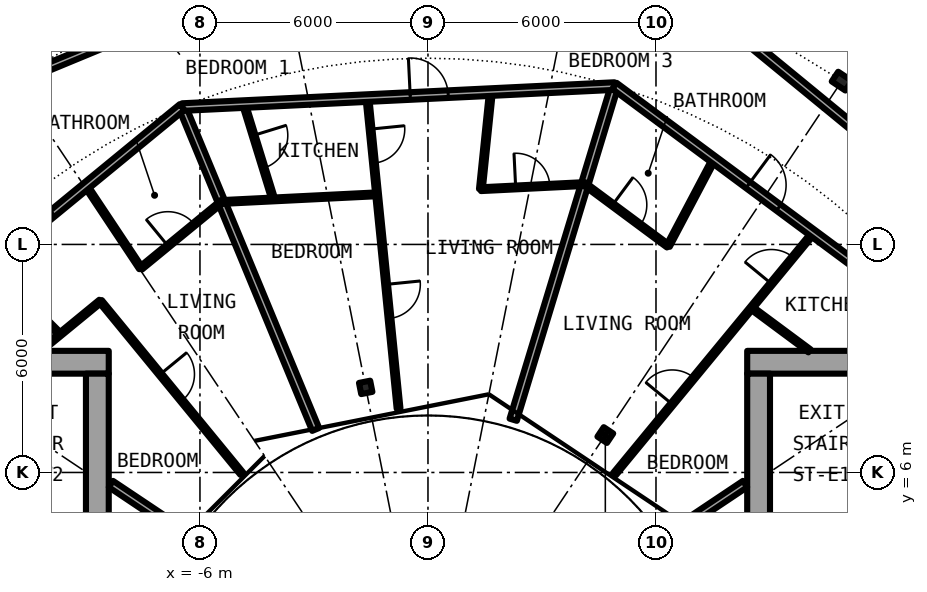
"""IFC4 building model, lengths in metres.
Left out: names, types, materials, properties, quantities, classifications, styles, units other than length and angle.
Written with IfcOpenShell. Run it as: python <this file> out.ifc"""

import sys

from ifc_helpers import new_model, si_unit, direction, frame, frame_2d, origin, origin_2d, place, context, subcontext, project, spatial, rectangle, i_section, extrude, element, fill, save


model = new_model("IFC4")
c1 = context("Model", 3, precision=1e-05, world=origin(), true_north=direction((0.0, 1.0)))
c2 = subcontext(c1, "Body", "Model", "MODEL_VIEW")
j1 = project(units=[si_unit("LENGTHUNIT", "METRE"), si_unit("PLANEANGLEUNIT", "RADIAN")], contexts=[c1])
p1 = place(None, origin())
s1 = spatial("IfcSite", under=j1, at=p1, CompositionType="ELEMENT")
p2 = place(p1, origin())
s2 = spatial("IfcBuilding", under=s1, at=p2, CompositionType="ELEMENT")
p3 = place(p2, frame((0.0, 0.0, 111.65)))
s3 = spatial("IfcBuildingStorey", under=s2, at=p3, CompositionType="ELEMENT", Elevation=111.65)
p4 = place(p3, frame((10.889, 16.297, 0.0), z_axis=(0.0, 0.0, 1.0), x_axis=(0.55557023302, 0.831469612303, 0.0)))
e1 = element("IfcColumn", 1, at=p4, inside=s3, PredefinedType="COLUMN", context=c2, shape_type="SweptSolid", body=[
    extrude(i_section(OverallWidth=0.307, OverallDepth=0.432, WebThickness=0.021, FlangeThickness=0.04, FilletRadius=0.027, at=origin_2d()), origin(), (0.0, 0.0, 1.0), 3.05),
])
for number, where, z_axis, x_axis in (
    (2, (4.667, 6.984, 0.0), (0.0, 0.0, 1.0), (0.556, 0.831, 0.0)),
    (3, (-1.639, 8.239, 0.0), (0.0, 0.0, 1.0), (-0.195, 0.981, 0.0)),
):
    element("IfcColumn", number, at=place(p3, frame(where, z_axis=z_axis, x_axis=x_axis)), inside=s3, PredefinedType="COLUMN", context=c2, shape_type="SweptSolid", body=[
        extrude(i_section(OverallWidth=0.3, OverallDepth=0.3, WebThickness=0.011, FlangeThickness=0.019, FilletRadius=0.027, at=origin_2d()), origin(), (0.0, 0.0, 1.0), 3.05),
    ])
p5 = place(p3, frame((22.2, 8.9, 0.0), z_axis=(0.0, 0.0, 1.0), x_axis=(-1.0, 0.0, 0.0)))
e4 = element("IfcWall", 4, at=p5, inside=s3, PredefinedType="SHEAR", context=c2, shape_type="SweptSolid", body=[
    extrude(rectangle(XDim=13.8, YDim=0.6, at=frame_2d((6.9, 0.0))), origin(), (0.0, 0.0, 1.0), 3.05),
])
p6 = place(p5, frame((1.125, 0.0, 0.0)))
e5 = element("IfcOpeningElement", 5, at=p6, cuts=e4, PredefinedType="OPENING", context=c2, shape_type="SweptSolid", body=[
    extrude(rectangle(XDim=1.2, YDim=2.3, at=frame_2d((0.6, 1.15))), frame((0.0, 0.31, 0.0), z_axis=(0.0, -1.0, 0.0), x_axis=(1.0, 0.0, 0.0)), (0.0, 0.0, 1.0), 0.62),
])
p7 = place(p3, frame((8.7, -8.6, 0.0), z_axis=(0.0, 0.0, 1.0), x_axis=(0.0, 1.0, 0.0)))
e6 = element("IfcWall", 6, at=p7, inside=s3, PredefinedType="SHEAR", context=c2, shape_type="SweptSolid", body=[
    extrude(rectangle(XDim=17.2, YDim=0.6, at=frame_2d((8.6, 0.0))), origin(), (0.0, 0.0, 1.0), 3.05),
])
p8 = place(p7, frame((7.4, 0.0, 0.1)))
e7 = element("IfcOpeningElement", 7, at=p8, cuts=e6, PredefinedType="OPENING", context=c2, shape_type="SweptSolid", body=[
    extrude(rectangle(XDim=2.4, YDim=2.2, at=frame_2d((1.2, 1.1))), frame((0.0, 0.31, 0.0), z_axis=(0.0, -1.0, 0.0), x_axis=(1.0, 0.0, 0.0)), (0.0, 0.0, 1.0), 0.62),
])
p9 = place(p3, frame((-8.4, 8.9, 0.0), z_axis=(0.0, 0.0, 1.0), x_axis=(-1.0, 0.0, 0.0)))
e8 = element("IfcWall", 8, at=p9, inside=s3, PredefinedType="SHEAR", context=c2, shape_type="SweptSolid", body=[
    extrude(rectangle(XDim=13.8, YDim=0.6, at=frame_2d((6.9, 0.0))), origin(), (0.0, 0.0, 1.0), 3.05),
])
p10 = place(p9, frame((11.475, 0.0, 0.0)))
e9 = element("IfcOpeningElement", 9, at=p10, cuts=e8, PredefinedType="OPENING", context=c2, shape_type="SweptSolid", body=[
    extrude(rectangle(XDim=1.2, YDim=2.3, at=frame_2d((0.6, 1.15))), frame((0.0, 0.31, 0.0), z_axis=(0.0, -1.0, 0.0), x_axis=(1.0, 0.0, 0.0)), (0.0, 0.0, 1.0), 0.62),
])
p11 = place(p3, frame((-8.7, 8.6, 0.0), z_axis=(0.0, 0.0, 1.0), x_axis=(0.0, -1.0, 0.0)))
e10 = element("IfcWall", 10, at=p11, inside=s3, PredefinedType="SHEAR", context=c2, shape_type="SweptSolid", body=[
    extrude(rectangle(XDim=17.2, YDim=0.6, at=frame_2d((8.6, 0.0))), origin(), (0.0, 0.0, 1.0), 3.05),
])
p12 = place(p11, frame((7.4, 0.0, 0.1)))
e11 = element("IfcOpeningElement", 11, at=p12, cuts=e10, PredefinedType="OPENING", context=c2, shape_type="SweptSolid", body=[
    extrude(rectangle(XDim=2.4, YDim=2.2, at=frame_2d((1.2, 1.1))), frame((0.0, 0.31, 0.0), z_axis=(0.0, -1.0, 0.0), x_axis=(1.0, 0.0, 0.0)), (0.0, 0.0, 1.0), 0.62),
])
p13 = place(p3, frame((-11.524, 11.464, 0.0), z_axis=(0.0, 0.0, 1.0), x_axis=(0.708796844581, -0.705412668665, 0.0)))
e12 = element("IfcWall", 12, at=p13, inside=s3, PredefinedType="PARTITIONING", context=c2, shape_type="SweptSolid", body=[
    extrude(rectangle(XDim=2.597, YDim=0.1, at=frame_2d((1.299, 0.0))), origin(), (0.0, 0.0, 1.0), 2.7),
])
p14 = place(p13, frame((0.849, 0.0, 0.0)))
e13 = element("IfcOpeningElement", 13, at=p14, cuts=e12, PredefinedType="OPENING", context=c2, shape_type="SweptSolid", body=[
    extrude(rectangle(XDim=0.9, YDim=2.3, at=frame_2d((0.45, 1.15))), frame((0.0, 0.06, 0.0), z_axis=(0.0, -1.0, 0.0), x_axis=(1.0, 0.0, 0.0)), (0.0, 0.0, 1.0), 0.12),
])
p15 = place(p3, frame((-8.996, 13.539, 0.0), z_axis=(0.0, 0.0, 1.0), x_axis=(0.553615197403, -0.83277260594, 0.0)))
e14 = element("IfcWall", 14, at=p15, inside=s3, PredefinedType="PARTITIONING", context=c2, shape_type="SweptSolid", body=[
    extrude(rectangle(XDim=2.597, YDim=0.1, at=frame_2d((1.299, 0.0))), origin(), (0.0, 0.0, 1.0), 2.7),
])
p16 = place(p3, frame((-8.62, 10.504, 0.0), z_axis=(0.0, 0.0, 1.0), x_axis=(0.634358693064, -0.773038840249, 0.0)))
e15 = element("IfcWall", 15, at=p16, inside=s3, PredefinedType="PARTITIONING", context=c2, shape_type="SweptSolid", body=[
    extrude(rectangle(XDim=5.868, YDim=0.1, at=frame_2d((2.934, 0.0))), origin(), (0.0, 0.0, 1.0), 2.7),
])
p17 = place(p16, frame((2.484, 0.0, 0.0)))
e16 = element("IfcOpeningElement", 16, at=p17, cuts=e15, PredefinedType="OPENING", context=c2, shape_type="SweptSolid", body=[
    extrude(rectangle(XDim=0.9, YDim=2.3, at=frame_2d((0.45, 1.15))), frame((0.0, 0.06, 0.0), z_axis=(0.0, -1.0, 0.0), x_axis=(1.0, 0.0, 0.0)), (0.0, 0.0, 1.0), 0.12),
])
p18 = place(p3, frame((-6.468, 15.614, 0.0), z_axis=(0.0, 0.0, 1.0), x_axis=(0.382646942224, -0.923894646378, 0.0)))
e17 = element("IfcWall", 17, at=p18, inside=s3, PredefinedType="PARTITIONING", context=c2, shape_type="SweptSolid", body=[
    extrude(rectangle(XDim=9.181, YDim=0.2, at=frame_2d((4.59, 0.0))), origin(), (0.0, 0.0, 1.0), 2.7),
])
p19 = place(p3, frame((-4.843, 15.693, 0.0), z_axis=(0.0, 0.0, 1.0), x_axis=(0.294961884541, -0.955509019669, 0.0)))
e18 = element("IfcWall", 18, at=p19, inside=s3, PredefinedType="PARTITIONING", context=c2, shape_type="SweptSolid", body=[
    extrude(rectangle(XDim=2.624, YDim=0.1, at=frame_2d((1.312, 0.0))), origin(), (0.0, 0.0, 1.0), 2.7),
])
p20 = place(p19, frame((0.862, 0.0, 0.0)))
e19 = element("IfcOpeningElement", 19, at=p20, cuts=e18, PredefinedType="OPENING", context=c2, shape_type="SweptSolid", body=[
    extrude(rectangle(XDim=0.9, YDim=2.3, at=frame_2d((0.45, 1.15))), frame((0.0, 0.06, 0.0), z_axis=(0.0, -1.0, 0.0), x_axis=(1.0, 0.0, 0.0)), (0.0, 0.0, 1.0), 0.12),
])
p21 = place(p3, frame((-1.593, 15.853, 0.0), z_axis=(0.0, 0.0, 1.0), x_axis=(0.099730339513, -0.995014502096, 0.0)))
e20 = element("IfcWall", 20, at=p21, inside=s3, PredefinedType="PARTITIONING", context=c2, shape_type="SweptSolid", body=[
    extrude(rectangle(XDim=8.213, YDim=0.1, at=frame_2d((4.106, 0.0))), origin(), (0.0, 0.0, 1.0), 2.7),
])
p22 = place(p21, frame((0.823, 0.0, 0.0)))
e21 = element("IfcOpeningElement", 21, at=p22, cuts=e20, PredefinedType="OPENING", context=c2, shape_type="SweptSolid", body=[
    extrude(rectangle(XDim=0.9, YDim=2.3, at=frame_2d((0.45, 1.15))), frame((0.0, 0.06, 0.0), z_axis=(0.0, -1.0, 0.0), x_axis=(1.0, 0.0, 0.0)), (0.0, 0.0, 1.0), 0.12),
])
p23 = place(p21, frame((4.929, 0.0, 0.0)))
e22 = element("IfcOpeningElement", 22, at=p23, cuts=e20, PredefinedType="OPENING", context=c2, shape_type="SweptSolid", body=[
    extrude(rectangle(XDim=0.9, YDim=2.3, at=frame_2d((0.45, 1.15))), frame((0.0, 0.06, 0.0), z_axis=(0.0, -1.0, 0.0), x_axis=(1.0, 0.0, 0.0)), (0.0, 0.0, 1.0), 0.12),
])
p24 = place(p3, frame((1.392, 13.454, 0.0), z_axis=(0.0, 0.0, 1.0), x_axis=(0.102594773028, 0.994723234145, 0.0)))
e23 = element("IfcWall", 23, at=p24, inside=s3, PredefinedType="PARTITIONING", context=c2, shape_type="SweptSolid", body=[
    extrude(rectangle(XDim=2.573, YDim=0.1, at=frame_2d((1.286, 0.0))), origin(), (0.0, 0.0, 1.0), 2.7),
])
p25 = place(p3, frame((2.243, 7.387, 0.0), z_axis=(0.0, 0.0, 1.0), x_axis=(0.290622919271, 0.956837665853, 0.0)))
e24 = element("IfcWall", 24, at=p25, inside=s3, PredefinedType="PARTITIONING", context=c2, shape_type="SweptSolid", body=[
    extrude(rectangle(XDim=9.18, YDim=0.2, at=frame_2d((4.59, 0.0))), origin(), (0.0, 0.0, 1.0), 2.7),
])
p26 = place(p3, frame((4.909, 5.958, 0.0), z_axis=(0.0, 0.0, 1.0), x_axis=(0.635976043025, 0.771708800454, 0.0)))
e25 = element("IfcWall", 25, at=p26, inside=s3, PredefinedType="PARTITIONING", context=c2, shape_type="SweptSolid", body=[
    extrude(rectangle(XDim=8.213, YDim=0.1, at=frame_2d((4.106, 0.0))), origin(), (0.0, 0.0, 1.0), 2.7),
])
p27 = place(p26, frame((6.49, 0.0, 0.0)))
e26 = element("IfcOpeningElement", 26, at=p27, cuts=e25, PredefinedType="OPENING", context=c2, shape_type="SweptSolid", body=[
    extrude(rectangle(XDim=0.9, YDim=2.3, at=frame_2d((0.45, 1.15))), frame((0.0, 0.06, 0.0), z_axis=(0.0, -1.0, 0.0), x_axis=(1.0, 0.0, 0.0)), (0.0, 0.0, 1.0), 0.12),
])
p28 = place(p26, frame((2.384, 0.0, 0.0)))
e27 = element("IfcOpeningElement", 27, at=p28, cuts=e25, PredefinedType="OPENING", context=c2, shape_type="SweptSolid", body=[
    extrude(rectangle(XDim=0.9, YDim=2.3, at=frame_2d((0.45, 1.15))), frame((0.0, 0.06, 0.0), z_axis=(0.0, -1.0, 0.0), x_axis=(1.0, 0.0, 0.0)), (0.0, 0.0, 1.0), 0.12),
])
p29 = place(p3, frame((6.318, 11.96, 0.0), z_axis=(0.0, 0.0, 1.0), x_axis=(0.467001992543, 0.884256263173, 0.0)))
e28 = element("IfcWall", 28, at=p29, inside=s3, PredefinedType="PARTITIONING", context=c2, shape_type="SweptSolid", body=[
    extrude(rectangle(XDim=2.572, YDim=0.1, at=frame_2d((1.286, 0.0))), origin(), (0.0, 0.0, 1.0), 2.7),
])
for number, where, z_axis, x_axis in (
    (29, (-6.513, 4.472, 0.0), (0.0, 0.0, 1.0), (-0.831, 0.556, 0.0)),
    (30, (6.513, 4.472, 0.0), (0.0, 0.0, 1.0), (0.831, 0.556, 0.0)),
):
    element("IfcWall", number, at=place(p3, frame(where, z_axis=z_axis, x_axis=x_axis)), inside=s3, PredefinedType="PARTITIONING", context=c2, shape_type="SweptSolid", body=[
        extrude(rectangle(XDim=2.203, YDim=0.2, at=frame_2d((1.101, 0.0))), origin(), (0.0, 0.0, 1.0), 2.7),
    ])
p30 = place(p3, frame((-5.439, 13.116, 0.0), z_axis=(0.0, 0.0, 1.0), x_axis=(0.998772010578, 0.049542616872, 0.0)))
e31 = element("IfcWall", 31, at=p30, inside=s3, PredefinedType="PARTITIONING", context=c2, shape_type="SweptSolid", body=[
    extrude(rectangle(XDim=4.1, YDim=0.1, at=frame_2d((2.05, 0.0))), origin(), (0.0, 0.0, 1.0), 2.7),
])
p31 = place(p3, frame((1.392, 13.454, 0.0), z_axis=(0.0, 0.0, 1.0), x_axis=(0.998779365748, 0.049394114582, 0.0)))
e32 = element("IfcWall", 32, at=p31, inside=s3, PredefinedType="PARTITIONING", context=c2, shape_type="SweptSolid", body=[
    extrude(rectangle(XDim=2.733, YDim=0.1, at=frame_2d((1.367, 0.0))), origin(), (0.0, 0.0, 1.0), 2.7),
])
p32 = place(p31, frame((0.917, 0.0, 0.0)))
e33 = element("IfcOpeningElement", 33, at=p32, cuts=e32, PredefinedType="OPENING", context=c2, shape_type="SweptSolid", body=[
    extrude(rectangle(XDim=0.9, YDim=2.3, at=frame_2d((0.45, 1.15))), frame((0.0, 0.06, 0.0), z_axis=(0.0, -1.0, 0.0), x_axis=(1.0, 0.0, 0.0)), (0.0, 0.0, 1.0), 0.12),
])
p33 = place(p3, frame((4.122, 13.589, 0.0), z_axis=(0.0, 0.0, 1.0), x_axis=(0.803128348509, -0.595806055542, 0.0)))
e34 = element("IfcWall", 34, at=p33, inside=s3, PredefinedType="PARTITIONING", context=c2, shape_type="SweptSolid", body=[
    extrude(rectangle(XDim=2.734, YDim=0.1, at=frame_2d((1.367, 0.0))), origin(), (0.0, 0.0, 1.0), 2.7),
])
p34 = place(p33, frame((0.917, 0.0, 0.0)))
e35 = element("IfcOpeningElement", 35, at=p34, cuts=e34, PredefinedType="OPENING", context=c2, shape_type="SweptSolid", body=[
    extrude(rectangle(XDim=0.9, YDim=2.3, at=frame_2d((0.45, 1.15))), frame((0.0, 0.06, 0.0), z_axis=(0.0, -1.0, 0.0), x_axis=(1.0, 0.0, 0.0)), (0.0, 0.0, 1.0), 0.12),
])
p35 = place(p3, frame((8.513, 10.332, 0.0), z_axis=(0.0, 0.0, 1.0), x_axis=(0.803149591038, -0.595777420196, 0.0)))
e36 = element("IfcWall", 36, at=p35, inside=s3, PredefinedType="PARTITIONING", context=c2, shape_type="SweptSolid", body=[
    extrude(rectangle(XDim=1.9, YDim=0.1, at=frame_2d((0.95, 0.0))), origin(), (0.0, 0.0, 1.0), 2.7),
])
p36 = place(p3, frame((-10.207, 9.202, 0.0), z_axis=(0.0, 0.0, 1.0), x_axis=(0.772998703631, 0.634407600983, 0.0)))
e37 = element("IfcWall", 37, at=p36, inside=s3, PredefinedType="PARTITIONING", context=c2, shape_type="SweptSolid", body=[
    extrude(rectangle(XDim=2.056, YDim=0.1, at=frame_2d((1.028, 0.0))), origin(), (0.0, 0.0, 1.0), 2.7),
])
p37 = place(p3, frame((-7.556, 11.377, 0.0), z_axis=(0.0, 0.0, 1.0), x_axis=(0.773149312811, 0.634224045665, 0.0)))
e38 = element("IfcWall", 38, at=p37, inside=s3, PredefinedType="PARTITIONING", context=c2, shape_type="SweptSolid", body=[
    extrude(rectangle(XDim=2.749, YDim=0.1, at=frame_2d((1.374, 0.0))), origin(), (0.0, 0.0, 1.0), 2.7),
])
p38 = place(p37, frame((0.922, 0.0, 0.0)))
e39 = element("IfcOpeningElement", 39, at=p38, cuts=e38, PredefinedType="OPENING", context=c2, shape_type="SweptSolid", body=[
    extrude(rectangle(XDim=0.9, YDim=2.3, at=frame_2d((0.45, 1.15))), frame((0.0, 0.06, 0.0), z_axis=(0.0, -1.0, 0.0), x_axis=(1.0, 0.0, 0.0)), (0.0, 0.0, 1.0), 0.12),
])
p39 = place(p3, frame((-6.467, 15.614, 0.0), z_axis=(0.0, 0.0, 1.0), x_axis=(0.998821060576, 0.048543680847, 0.0)))
e40 = element("IfcWall", 40, at=p39, inside=s3, PredefinedType="PARTITIONING", context=c2, shape_type="SweptSolid", body=[
    extrude(rectangle(XDim=11.391, YDim=0.2, at=frame_2d((5.696, 0.0))), origin(), (0.0, 0.0, 1.0), 2.7),
])
p40 = place(p39, frame((6.007, 0.0, 0.0)))
e41 = element("IfcOpeningElement", 41, at=p40, cuts=e40, PredefinedType="OPENING", context=c2, shape_type="SweptSolid", body=[
    extrude(rectangle(XDim=1.0, YDim=2.3, at=frame_2d((0.5, 1.15))), frame((0.0, 0.11, 0.0), z_axis=(0.0, -1.0, 0.0), x_axis=(1.0, 0.0, 0.0)), (0.0, 0.0, 1.0), 0.22),
])
p41 = place(p3, frame((4.906, 16.172, 0.0), z_axis=(0.0, 0.0, 1.0), x_axis=(0.803191461888, -0.595720971219, 0.0)))
e42 = element("IfcWall", 42, at=p41, inside=s3, PredefinedType="PARTITIONING", context=c2, shape_type="SweptSolid", body=[
    extrude(rectangle(XDim=9.76, YDim=0.2, at=frame_2d((4.88, 0.0))), origin(), (0.0, 0.0, 1.0), 2.7),
])
p42 = place(p41, frame((4.38, 0.0, 0.0)))
e43 = element("IfcOpeningElement", 43, at=p42, cuts=e42, PredefinedType="OPENING", context=c2, shape_type="SweptSolid", body=[
    extrude(rectangle(XDim=1.0, YDim=2.3, at=frame_2d((0.5, 1.15))), frame((0.0, 0.11, 0.0), z_axis=(0.0, -1.0, 0.0), x_axis=(1.0, 0.0, 0.0)), (0.0, 0.0, 1.0), 0.22),
])
p43 = place(p3, frame((-14.052, 9.389, 0.0), z_axis=(0.0, 0.0, 1.0), x_axis=(0.77292501819, 0.634497372931, 0.0)))
e44 = element("IfcWall", 44, at=p43, inside=s3, PredefinedType="PARTITIONING", context=c2, shape_type="SweptSolid", body=[
    extrude(rectangle(XDim=9.81, YDim=0.2, at=frame_2d((4.905, 0.0))), origin(), (0.0, 0.0, 1.0), 2.7),
])
p44 = place(p43, frame((4.406, 0.0, 0.0)))
e45 = element("IfcOpeningElement", 45, at=p44, cuts=e44, PredefinedType="OPENING", context=c2, shape_type="SweptSolid", body=[
    extrude(rectangle(XDim=1.0, YDim=2.3, at=frame_2d((0.5, 1.15))), frame((0.0, 0.11, 0.0), z_axis=(0.0, -1.0, 0.0), x_axis=(1.0, 0.0, 0.0)), (0.0, 0.0, 1.0), 0.22),
])
p45 = place(p3, frame((7.5, 18.108, 0.0), z_axis=(0.0, 0.0, 1.0), x_axis=(0.773049018445, -0.634346289562, 0.0)))
e46 = element("IfcWall", 46, at=p45, inside=s3, PredefinedType="PARTITIONING", context=c2, shape_type="SweptSolid", body=[
    extrude(rectangle(XDim=11.219, YDim=0.2, at=frame_2d((5.61, 0.0))), origin(), (0.0, 0.0, 1.0), 2.39),
])
p46 = place(p45, frame((7.085, 0.0, 0.0)))
e47 = element("IfcOpeningElement", 47, at=p46, cuts=e46, PredefinedType="OPENING", context=c2, shape_type="SweptSolid", body=[
    extrude(rectangle(XDim=1.0, YDim=2.3, at=frame_2d((0.5, 1.15))), frame((0.0, 0.11, 0.0), z_axis=(0.0, -1.0, 0.0), x_axis=(1.0, 0.0, 0.0)), (0.0, 0.0, 1.0), 0.22),
])
p47 = place(p3, frame((-10.745, 16.357, 0.0), z_axis=(0.0, 0.0, 1.0), x_axis=(0.923928411035, 0.382565407848, 0.0)))
e48 = element("IfcWall", 48, at=p47, inside=s3, PredefinedType="PARTITIONING", context=c2, shape_type="SweptSolid", body=[
    extrude(rectangle(XDim=7.335, YDim=0.2, at=frame_2d((3.667, 0.0))), origin(), (0.0, 0.0, 1.0), 2.39),
])
p48 = place(p47, frame((2.212, 0.0, 0.0)))
e49 = element("IfcOpeningElement", 49, at=p48, cuts=e48, PredefinedType="OPENING", context=c2, shape_type="SweptSolid", body=[
    extrude(rectangle(XDim=1.0, YDim=2.3, at=frame_2d((0.5, 1.15))), frame((0.0, 0.11, 0.0), z_axis=(0.0, -1.0, 0.0), x_axis=(1.0, 0.0, 0.0)), (0.0, 0.0, 1.0), 0.22),
])
p49 = place(p3, frame((8.534, 20.603, 0.0), z_axis=(0.0, 0.0, 1.0), x_axis=(0.773000340237, -0.634405606843, 0.0)))
e50 = element("IfcWall", 50, at=p49, inside=s3, PredefinedType="PARTITIONING", context=c2, shape_type="SweptSolid", body=[
    extrude(rectangle(XDim=6.474, YDim=0.1, at=frame_2d((3.237, 0.0))), origin(), (0.0, 0.0, 1.0), 2.7),
])
p50 = place(p42, origin())
e51 = element("IfcDoor", 51, at=p50, inside=s3, OperationType="SINGLE_SWING_LEFT", PredefinedType="DOOR", context=c2, shape_type="SweptSolid", body=[
    extrude(rectangle(XDim=1.0, YDim=2.3, at=frame_2d((0.5, 1.15))), frame((0.0, 0.025, 0.0), z_axis=(0.0, -1.0, 0.0), x_axis=(1.0, 0.0, 0.0)), (0.0, 0.0, 1.0), 0.05),
])
fill(e43, e51)
p51 = place(p34, origin())
e52 = element("IfcDoor", 52, at=p51, inside=s3, OperationType="SINGLE_SWING_LEFT", PredefinedType="DOOR", context=c2, shape_type="SweptSolid", body=[
    extrude(rectangle(XDim=0.9, YDim=2.3, at=frame_2d((0.45, 1.15))), frame((0.0, 0.025, 0.0), z_axis=(0.0, -1.0, 0.0), x_axis=(1.0, 0.0, 0.0)), (0.0, 0.0, 1.0), 0.05),
])
fill(e35, e52)
p52 = place(p27, origin())
e53 = element("IfcDoor", 53, at=p52, inside=s3, OperationType="SINGLE_SWING_RIGHT", PredefinedType="DOOR", context=c2, shape_type="SweptSolid", body=[
    extrude(rectangle(XDim=0.9, YDim=2.3, at=frame_2d((0.45, 1.15))), frame((0.0, 0.025, 0.0), z_axis=(0.0, -1.0, 0.0), x_axis=(1.0, 0.0, 0.0)), (0.0, 0.0, 1.0), 0.05),
])
fill(e26, e53)
p53 = place(p28, origin())
e54 = element("IfcDoor", 54, at=p53, inside=s3, OperationType="SINGLE_SWING_LEFT", PredefinedType="DOOR", context=c2, shape_type="SweptSolid", body=[
    extrude(rectangle(XDim=0.9, YDim=2.3, at=frame_2d((0.45, 1.15))), frame((0.0, 0.025, 0.0), z_axis=(0.0, -1.0, 0.0), x_axis=(1.0, 0.0, 0.0)), (0.0, 0.0, 1.0), 0.05),
])
fill(e27, e54)
p54 = place(p40, origin())
e55 = element("IfcDoor", 55, at=p54, inside=s3, OperationType="SINGLE_SWING_RIGHT", PredefinedType="DOOR", context=c2, shape_type="SweptSolid", body=[
    extrude(rectangle(XDim=1.0, YDim=2.3, at=frame_2d((0.5, 1.15))), frame((0.0, 0.025, 0.0), z_axis=(0.0, -1.0, 0.0), x_axis=(1.0, 0.0, 0.0)), (0.0, 0.0, 1.0), 0.05),
])
fill(e41, e55)
p55 = place(p32, origin())
e56 = element("IfcDoor", 56, at=p55, inside=s3, OperationType="SINGLE_SWING_RIGHT", PredefinedType="DOOR", context=c2, shape_type="SweptSolid", body=[
    extrude(rectangle(XDim=0.9, YDim=2.3, at=frame_2d((0.45, 1.15))), frame((0.0, 0.025, 0.0), z_axis=(0.0, -1.0, 0.0), x_axis=(1.0, 0.0, 0.0)), (0.0, 0.0, 1.0), 0.05),
])
fill(e33, e56)
p56 = place(p22, origin())
e57 = element("IfcDoor", 57, at=p56, inside=s3, OperationType="SINGLE_SWING_LEFT", PredefinedType="DOOR", context=c2, shape_type="SweptSolid", body=[
    extrude(rectangle(XDim=0.9, YDim=2.3, at=frame_2d((0.45, 1.15))), frame((0.0, 0.025, 0.0), z_axis=(0.0, -1.0, 0.0), x_axis=(1.0, 0.0, 0.0)), (0.0, 0.0, 1.0), 0.05),
])
fill(e21, e57)
p57 = place(p20, origin())
e58 = element("IfcDoor", 58, at=p57, inside=s3, OperationType="SINGLE_SWING_RIGHT", PredefinedType="DOOR", context=c2, shape_type="SweptSolid", body=[
    extrude(rectangle(XDim=0.9, YDim=2.3, at=frame_2d((0.45, 1.15))), frame((0.0, 0.025, 0.0), z_axis=(0.0, -1.0, 0.0), x_axis=(1.0, 0.0, 0.0)), (0.0, 0.0, 1.0), 0.05),
])
fill(e19, e58)
p58 = place(p23, origin())
e59 = element("IfcDoor", 59, at=p58, inside=s3, OperationType="SINGLE_SWING_RIGHT", PredefinedType="DOOR", context=c2, shape_type="SweptSolid", body=[
    extrude(rectangle(XDim=0.9, YDim=2.3, at=frame_2d((0.45, 1.15))), frame((0.0, 0.025, 0.0), z_axis=(0.0, -1.0, 0.0), x_axis=(1.0, 0.0, 0.0)), (0.0, 0.0, 1.0), 0.05),
])
fill(e22, e59)
p59 = place(p44, origin())
e60 = element("IfcDoor", 60, at=p59, inside=s3, OperationType="SINGLE_SWING_RIGHT", PredefinedType="DOOR", context=c2, shape_type="SweptSolid", body=[
    extrude(rectangle(XDim=1.0, YDim=2.3, at=frame_2d((0.5, 1.15))), frame((0.0, 0.025, 0.0), z_axis=(0.0, -1.0, 0.0), x_axis=(1.0, 0.0, 0.0)), (0.0, 0.0, 1.0), 0.05),
])
fill(e45, e60)
p60 = place(p38, origin())
e61 = element("IfcDoor", 61, at=p60, inside=s3, OperationType="SINGLE_SWING_LEFT", PredefinedType="DOOR", context=c2, shape_type="SweptSolid", body=[
    extrude(rectangle(XDim=0.9, YDim=2.3, at=frame_2d((0.45, 1.15))), frame((0.0, 0.025, 0.0), z_axis=(0.0, -1.0, 0.0), x_axis=(1.0, 0.0, 0.0)), (0.0, 0.0, 1.0), 0.05),
])
fill(e39, e61)
p61 = place(p17, origin())
e62 = element("IfcDoor", 62, at=p61, inside=s3, OperationType="SINGLE_SWING_RIGHT", PredefinedType="DOOR", context=c2, shape_type="SweptSolid", body=[
    extrude(rectangle(XDim=0.9, YDim=2.3, at=frame_2d((0.45, 1.15))), frame((0.0, 0.025, 0.0), z_axis=(0.0, -1.0, 0.0), x_axis=(1.0, 0.0, 0.0)), (0.0, 0.0, 1.0), 0.05),
])
fill(e16, e62)
save(model, sys.argv[1])
